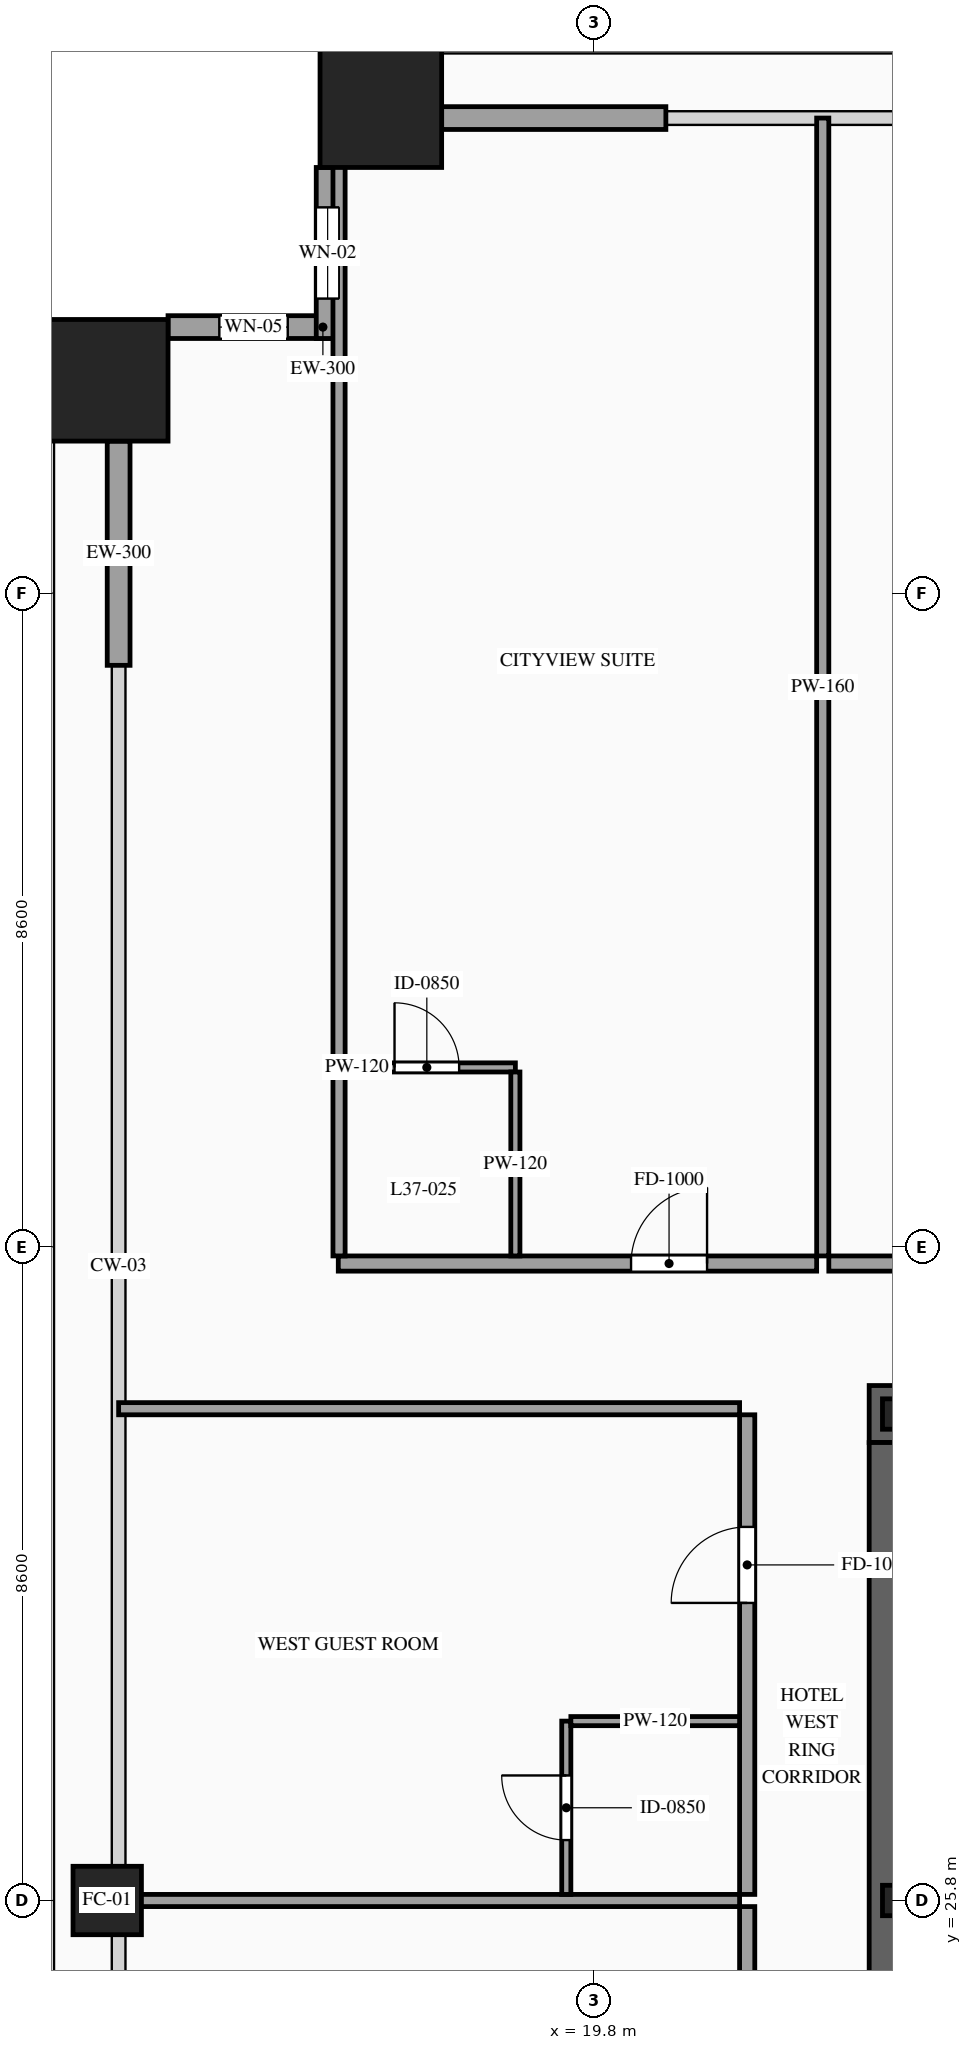
"""IFC4 building model, lengths in metres.
Left out: names, types, materials, properties, quantities, classifications, styles, units other than length and angle.
Written with IfcOpenShell. Run it as: python <this file> out.ifc"""

import sys

from ifc_helpers import new_model, si_unit, direction, frame, frame_2d, origin, origin_2d, place, context, subcontext, project, spatial, rectangle, hollow_rectangle, i_section, extrude, source, transform, mapped, element, fill, save


model = new_model("IFC4")
c1 = context("Model", 3, precision=1e-05, world=origin(), true_north=direction((0.0, 1.0)))
c2 = subcontext(c1, "Body", "Model", "MODEL_VIEW")
j1 = project(units=[si_unit("LENGTHUNIT", "METRE"), si_unit("PLANEANGLEUNIT", "RADIAN")], contexts=[c1])
p1 = place(None, origin())
s1 = spatial("IfcSite", under=j1, at=p1, CompositionType="ELEMENT")
p2 = place(p1, origin())
s2 = spatial("IfcBuilding", under=s1, at=p2, CompositionType="ELEMENT")
p3 = place(p2, frame((0.0, 0.0, 141.6)))
s3 = spatial("IfcBuildingStorey", under=s2, at=p3, CompositionType="ELEMENT", Elevation=141.6)
p4 = place(p3, frame((23.425, 32.2, 0.0), z_axis=(0.0, 0.0, 1.0), x_axis=(1.0, 0.0, 0.0)))
e1 = element("IfcWall", 1, at=p4, inside=s3, PredefinedType="SHEAR", context=c2, shape_type="SweptSolid", body=[
    extrude(rectangle(XDim=27.15, YDim=0.75, at=frame_2d((13.575, 0.0))), origin(), (0.0, 0.0, 1.0), 3.6),
])
p5 = place(p4, frame((4.645, 0.0, 0.0)))
e2 = element("IfcOpeningElement", 2, at=p5, cuts=e1, PredefinedType="OPENING", context=c2, shape_type="SweptSolid", body=[
    extrude(rectangle(XDim=0.9, YDim=2.15, at=frame_2d((0.45, 1.075))), frame((0.0, 0.39, 0.0), z_axis=(0.0, -1.0, 0.0), x_axis=(1.0, 0.0, 0.0)), (0.0, 0.0, 1.0), 0.78),
])
p6 = place(p4, frame((9.925, 0.0, 0.0)))
e3 = element("IfcOpeningElement", 3, at=p6, cuts=e1, PredefinedType="OPENING", context=c2, shape_type="SweptSolid", body=[
    extrude(rectangle(XDim=1.1, YDim=2.2, at=frame_2d((0.55, 1.1))), frame((0.0, 0.39, 0.0), z_axis=(0.0, -1.0, 0.0), x_axis=(1.0, 0.0, 0.0)), (0.0, 0.0, 1.0), 0.78),
])
p7 = place(p4, frame((15.775, 0.0, 0.0)))
e4 = element("IfcOpeningElement", 4, at=p7, cuts=e1, PredefinedType="OPENING", context=c2, shape_type="SweptSolid", body=[
    extrude(rectangle(XDim=1.1, YDim=2.2, at=frame_2d((0.55, 1.1))), frame((0.0, 0.39, 0.0), z_axis=(0.0, -1.0, 0.0), x_axis=(1.0, 0.0, 0.0)), (0.0, 0.0, 1.0), 0.78),
])
p8 = place(p4, frame((18.975, 0.0, 0.0)))
e5 = element("IfcOpeningElement", 5, at=p8, cuts=e1, PredefinedType="OPENING", context=c2, shape_type="SweptSolid", body=[
    extrude(rectangle(XDim=0.9, YDim=2.15, at=frame_2d((0.45, 1.075))), frame((0.0, 0.39, 0.0), z_axis=(0.0, -1.0, 0.0), x_axis=(1.0, 0.0, 0.0)), (0.0, 0.0, 1.0), 0.78),
])
m1 = source(origin(), c2, "Body", "SweptSolid", [
    extrude(rectangle(XDim=12.05, YDim=0.75, at=frame_2d((6.025, 0.0))), origin(), (0.0, 0.0, 1.0), 3.6),
])
p9 = place(p3, frame((23.8, 19.775, 0.0), z_axis=(0.0, 0.0, 1.0), x_axis=(0.0, 1.0, 0.0)))
e6 = element("IfcWall", 6, at=p9, inside=s3, PredefinedType="SHEAR", context=c2, shape_type="MappedRepresentation", body=[
    mapped(m1, transform((0.0, 0.0, 0.0), scale=1.0)),
])
m2 = source(origin(), c2, "Body", "SweptSolid", [
    extrude(i_section(OverallWidth=0.4, OverallDepth=0.4, WebThickness=0.013, FlangeThickness=0.021, at=origin_2d()), origin(), (0.0, 0.0, 1.0), 3.6),
])
for number, where, z_axis, x_axis in (
    (7, (23.8, 25.8, 0.0), (0.0, 0.0, 1.0), (1.0, 0.0, 0.0)),
    (8, (23.8, 32.2, 0.0), (0.0, 0.0, 1.0), (1.0, 0.0, 0.0)),
):
    element("IfcColumn", number, at=place(p3, frame(where, z_axis=z_axis, x_axis=x_axis)), inside=s3, PredefinedType="COLUMN", context=c2, shape_type="MappedRepresentation", body=[
        mapped(m2, transform((0.0, 0.0, 0.0), scale=1.0)),
    ])
m3 = source(origin(), c2, "Body", "SweptSolid", [
    extrude(hollow_rectangle(XDim=1.6, YDim=1.6, WallThickness=0.07, at=origin_2d()), origin(), (0.0, 0.0, 1.0), 3.6),
])
p10 = place(p3, frame((17.0, 49.4, 0.0), z_axis=(0.0, 0.0, 1.0), x_axis=(1.0, 0.0, 0.0)))
e9 = element("IfcColumn", 9, at=p10, inside=s3, PredefinedType="COLUMN", context=c2, shape_type="MappedRepresentation", body=[
    mapped(m3, transform((0.0, 0.0, 0.0), scale=1.0)),
])
m4 = source(origin(), c2, "Body", "SweptSolid", [
    extrude(hollow_rectangle(XDim=0.9, YDim=0.9, WallThickness=0.042, at=origin_2d()), origin(), (0.0, 0.0, 1.0), 3.6),
])
p11 = place(p3, frame((13.4, 25.8, 0.0), z_axis=(0.0, 0.0, 1.0), x_axis=(1.0, 0.0, 0.0)))
e10 = element("IfcColumn", 10, at=p11, inside=s3, PredefinedType="COLUMN", context=c2, shape_type="MappedRepresentation", body=[
    mapped(m4, transform((0.0, 0.0, 0.0), scale=1.0)),
])
p12 = place(p3, frame((13.4, 45.8, 0.0), z_axis=(0.0, 0.0, 1.0), x_axis=(1.0, 0.0, 0.0)))
e11 = element("IfcColumn", 11, at=p12, inside=s3, PredefinedType="COLUMN", context=c2, shape_type="MappedRepresentation", body=[
    mapped(m3, transform((0.0, 0.0, 0.0), scale=1.0)),
])
p13 = place(p3, frame((16.45, 46.5, 0.0), z_axis=(0.0, 0.0, 1.0), x_axis=(-1.0, 0.0, 0.0)))
e12 = element("IfcWall", 12, at=p13, inside=s3, PredefinedType="SOLIDWALL", context=c2, shape_type="SweptSolid", body=[
    extrude(rectangle(XDim=2.25, YDim=0.3, at=frame_2d((1.125, 0.0))), origin(), (0.0, 0.0, 1.0), 3.38),
])
p14 = place(p13, frame((0.675, 0.0, 0.85)))
e13 = element("IfcOpeningElement", 13, at=p14, cuts=e12, PredefinedType="OPENING", context=c2, shape_type="SweptSolid", body=[
    extrude(rectangle(XDim=0.9, YDim=1.5, at=frame_2d((0.45, 0.75))), frame((0.0, 0.165, 0.0), z_axis=(0.0, -1.0, 0.0), x_axis=(1.0, 0.0, 0.0)), (0.0, 0.0, 1.0), 0.33),
])
p15 = place(p3, frame((16.3, 48.6, 0.0), z_axis=(0.0, 0.0, 1.0), x_axis=(0.0, -1.0, 0.0)))
e14 = element("IfcWall", 14, at=p15, inside=s3, PredefinedType="SOLIDWALL", context=c2, shape_type="SweptSolid", body=[
    extrude(rectangle(XDim=2.25, YDim=0.3, at=frame_2d((1.125, 0.0))), origin(), (0.0, 0.0, 1.0), 3.38),
])
p16 = place(p15, frame((0.525, 0.0, 0.85)))
e15 = element("IfcOpeningElement", 15, at=p16, cuts=e14, PredefinedType="OPENING", context=c2, shape_type="SweptSolid", body=[
    extrude(rectangle(XDim=1.2, YDim=2.1, at=frame_2d((0.6, 1.05))), frame((0.0, 0.165, 0.0), z_axis=(0.0, -1.0, 0.0), x_axis=(1.0, 0.0, 0.0)), (0.0, 0.0, 1.0), 0.33),
])
m5 = source(origin(), c2, "Body", "SweptSolid", [
    extrude(rectangle(XDim=2.95, YDim=0.3, at=frame_2d((1.475, 0.0))), origin(), (0.0, 0.0, 1.0), 2.775),
])
for number, where, z_axis, x_axis in (
    (16, (17.8, 49.25, 0.0), (0.0, 0.0, 1.0), (1.0, 0.0, 0.0)),
    (17, (13.55, 42.05, 0.0), (0.0, 0.0, 1.0), (0.0, 1.0, 0.0)),
):
    element("IfcWall", number, at=place(p3, frame(where, z_axis=z_axis, x_axis=x_axis)), inside=s3, PredefinedType="SOLIDWALL", context=c2, shape_type="MappedRepresentation", body=[
        mapped(m5, transform((0.0, 0.0, 0.0), scale=1.0)),
    ])
p17 = place(p3, frame((16.44, 34.18, 0.0), z_axis=(0.0, 0.0, 1.0), x_axis=(1.0, 0.0, 0.0)))
e18 = element("IfcWall", 18, at=p17, inside=s3, PredefinedType="PARTITIONING", context=c2, shape_type="SweptSolid", body=[
    extrude(rectangle(XDim=6.294, YDim=0.2, at=frame_2d((3.147, 0.0))), origin(), (0.0, 0.0, 1.0), 3.38),
])
p18 = place(p17, frame((3.852, 0.0, 0.0)))
e19 = element("IfcOpeningElement", 19, at=p18, cuts=e18, PredefinedType="OPENING", context=c2, shape_type="SweptSolid", body=[
    extrude(rectangle(XDim=1.0, YDim=2.2, at=frame_2d((0.5, 1.1))), frame((0.0, 0.115, 0.0), z_axis=(0.0, -1.0, 0.0), x_axis=(1.0, 0.0, 0.0)), (0.0, 0.0, 1.0), 0.23),
])
m6 = source(origin(), c2, "Body", "SweptSolid", [
    extrude(rectangle(XDim=14.97, YDim=0.16, at=frame_2d((7.485, 0.0))), origin(), (0.0, 0.0, 1.0), 3.38),
])
p19 = place(p3, frame((22.814, 34.28, 0.0), z_axis=(0.0, 0.0, 1.0), x_axis=(0.0, 1.0, 0.0)))
e20 = element("IfcWall", 20, at=p19, inside=s3, PredefinedType="PARTITIONING", context=c2, shape_type="MappedRepresentation", body=[
    mapped(m6, transform((0.0, 0.0, 0.0), scale=1.0)),
])
p20 = place(p3, frame((16.44, 36.76, 0.0), z_axis=(0.0, 0.0, 1.0), x_axis=(1.0, 0.0, 0.0)))
e21 = element("IfcWall", 21, at=p20, inside=s3, PredefinedType="PARTITIONING", context=c2, shape_type="SweptSolid", body=[
    extrude(rectangle(XDim=2.33, YDim=0.12, at=frame_2d((1.165, 0.0))), origin(), (0.0, 0.0, 1.0), 3.38),
])
p21 = place(p20, frame((0.74, 0.0, 0.0)))
e22 = element("IfcOpeningElement", 22, at=p21, cuts=e21, PredefinedType="OPENING", context=c2, shape_type="SweptSolid", body=[
    extrude(rectangle(XDim=0.85, YDim=2.1, at=frame_2d((0.425, 1.05))), frame((0.0, 0.075, 0.0), z_axis=(0.0, -1.0, 0.0), x_axis=(1.0, 0.0, 0.0)), (0.0, 0.0, 1.0), 0.15),
])
m7 = source(origin(), c2, "Body", "SweptSolid", [
    extrude(rectangle(XDim=2.42, YDim=0.12, at=frame_2d((1.21, 0.0))), origin(), (0.0, 0.0, 1.0), 3.38),
])
p22 = place(p3, frame((18.77, 34.28, 0.0), z_axis=(0.0, 0.0, 1.0), x_axis=(0.0, 1.0, 0.0)))
e23 = element("IfcWall", 23, at=p22, inside=s3, PredefinedType="PARTITIONING", context=c2, shape_type="MappedRepresentation", body=[
    mapped(m7, transform((0.0, 0.0, 0.0), scale=1.0)),
])
p23 = place(p3, frame((22.894, 34.18, 0.0), z_axis=(0.0, 0.0, 1.0), x_axis=(1.0, 0.0, 0.0)))
e24 = element("IfcWall", 24, at=p23, inside=s3, PredefinedType="PARTITIONING", context=c2, shape_type="SweptSolid", body=[
    extrude(rectangle(XDim=11.024, YDim=0.2, at=frame_2d((5.512, 0.0))), origin(), (0.0, 0.0, 1.0), 3.38),
])
p24 = place(p23, frame((5.012, 0.0, 0.0)))
e25 = element("IfcOpeningElement", 25, at=p24, cuts=e24, PredefinedType="OPENING", context=c2, shape_type="SweptSolid", body=[
    extrude(rectangle(XDim=1.0, YDim=2.2, at=frame_2d((0.5, 1.1))), frame((0.0, 0.115, 0.0), z_axis=(0.0, -1.0, 0.0), x_axis=(1.0, 0.0, 0.0)), (0.0, 0.0, 1.0), 0.23),
])
m8 = source(origin(), c2, "Body", "SweptSolid", [
    extrude(rectangle(XDim=14.82, YDim=0.16, at=frame_2d((7.41, 0.0))), origin(), (0.0, 0.0, 1.0), 3.38),
])
p25 = place(p3, frame((16.45, 34.28, 0.0), z_axis=(0.0, 0.0, 1.0), x_axis=(0.0, 1.0, 0.0)))
e26 = element("IfcWall", 26, at=p25, inside=s3, PredefinedType="PARTITIONING", context=c2, shape_type="MappedRepresentation", body=[
    mapped(m8, transform((0.0, 0.0, 0.0), scale=1.0)),
])
p26 = place(p3, frame((21.82, 19.41, 0.0), z_axis=(0.0, 0.0, 1.0), x_axis=(0.0, 1.0, 0.0)))
e27 = element("IfcWall", 27, at=p26, inside=s3, PredefinedType="PARTITIONING", context=c2, shape_type="SweptSolid", body=[
    extrude(rectangle(XDim=6.31, YDim=0.2, at=frame_2d((3.155, 0.0))), origin(), (0.0, 0.0, 1.0), 3.38),
])
p27 = place(p26, frame((3.835, 0.0, 0.0)))
e28 = element("IfcOpeningElement", 28, at=p27, cuts=e27, PredefinedType="OPENING", context=c2, shape_type="SweptSolid", body=[
    extrude(rectangle(XDim=1.0, YDim=2.2, at=frame_2d((0.5, 1.1))), frame((0.0, 0.115, 0.0), z_axis=(0.0, -1.0, 0.0), x_axis=(1.0, 0.0, 0.0)), (0.0, 0.0, 1.0), 0.23),
])
m9 = source(origin(), c2, "Body", "SweptSolid", [
    extrude(rectangle(XDim=8.17, YDim=0.16, at=frame_2d((4.085, 0.0))), origin(), (0.0, 0.0, 1.0), 2.675),
])
p28 = place(p3, frame((13.55, 25.8, 0.0), z_axis=(0.0, 0.0, 1.0), x_axis=(1.0, 0.0, 0.0)))
e29 = element("IfcWall", 29, at=p28, inside=s3, PredefinedType="PARTITIONING", context=c2, shape_type="MappedRepresentation", body=[
    mapped(m9, transform((0.0, 0.0, 0.0), scale=1.0)),
])
p29 = place(p3, frame((21.82, 25.88, 0.0), z_axis=(0.0, 0.0, 1.0), x_axis=(0.0, 1.0, 0.0)))
e30 = element("IfcWall", 30, at=p29, inside=s3, PredefinedType="PARTITIONING", context=c2, shape_type="SweptSolid", body=[
    extrude(rectangle(XDim=6.31, YDim=0.2, at=frame_2d((3.155, 0.0))), origin(), (0.0, 0.0, 1.0), 3.38),
])
p30 = place(p29, frame((3.835, 0.0, 0.0)))
e31 = element("IfcOpeningElement", 31, at=p30, cuts=e30, PredefinedType="OPENING", context=c2, shape_type="SweptSolid", body=[
    extrude(rectangle(XDim=1.0, YDim=2.2, at=frame_2d((0.5, 1.1))), frame((0.0, 0.115, 0.0), z_axis=(0.0, -1.0, 0.0), x_axis=(1.0, 0.0, 0.0)), (0.0, 0.0, 1.0), 0.23),
])
m10 = source(origin(), c2, "Body", "SweptSolid", [
    extrude(rectangle(XDim=8.17, YDim=0.16, at=frame_2d((4.085, 0.0))), origin(), (0.0, 0.0, 1.0), 2.875),
])
p31 = place(p3, frame((13.55, 32.27, 0.0), z_axis=(0.0, 0.0, 1.0), x_axis=(1.0, 0.0, 0.0)))
e32 = element("IfcWall", 32, at=p31, inside=s3, PredefinedType="PARTITIONING", context=c2, shape_type="MappedRepresentation", body=[
    mapped(m10, transform((0.0, 0.0, 0.0), scale=1.0)),
])
p32 = place(p3, frame((19.44, 25.88, 0.0), z_axis=(0.0, 0.0, 1.0), x_axis=(0.0, 1.0, 0.0)))
e33 = element("IfcWall", 33, at=p32, inside=s3, PredefinedType="PARTITIONING", context=c2, shape_type="SweptSolid", body=[
    extrude(rectangle(XDim=2.28, YDim=0.12, at=frame_2d((1.14, 0.0))), origin(), (0.0, 0.0, 1.0), 3.38),
])
p33 = place(p32, frame((0.715, 0.0, 0.0)))
e34 = element("IfcOpeningElement", 34, at=p33, cuts=e33, PredefinedType="OPENING", context=c2, shape_type="SweptSolid", body=[
    extrude(rectangle(XDim=0.85, YDim=2.1, at=frame_2d((0.425, 1.05))), frame((0.0, 0.075, 0.0), z_axis=(0.0, -1.0, 0.0), x_axis=(1.0, 0.0, 0.0)), (0.0, 0.0, 1.0), 0.15),
])
m11 = source(origin(), c2, "Body", "SweptSolid", [
    extrude(rectangle(XDim=2.22, YDim=0.12, at=frame_2d((1.11, 0.0))), origin(), (0.0, 0.0, 1.0), 3.38),
])
p34 = place(p3, frame((19.5, 28.16, 0.0), z_axis=(0.0, 0.0, 1.0), x_axis=(1.0, 0.0, 0.0)))
e35 = element("IfcWall", 35, at=p34, inside=s3, PredefinedType="PARTITIONING", context=c2, shape_type="MappedRepresentation", body=[
    mapped(m11, transform((0.0, 0.0, 0.0), scale=1.0)),
])
m12 = source(origin(), c2, "Body", "SweptSolid", [
    extrude(rectangle(XDim=0.9, YDim=1.5, at=frame_2d((0.45, 0.75))), frame((0.0, 0.03, 0.0), z_axis=(0.0, -1.0, 0.0), x_axis=(1.0, 0.0, 0.0)), (0.0, 0.0, 1.0), 0.06),
])
p35 = place(p14, origin())
e36 = element("IfcWindow", 36, at=p35, inside=s3, PartitioningType="SINGLE_PANEL", PredefinedType="WINDOW", context=c2, shape_type="MappedRepresentation", body=[
    mapped(m12, transform((0.0, 0.0, 0.0), scale=1.0)),
])
fill(e13, e36)
m13 = source(origin(), c2, "Body", "SweptSolid", [
    extrude(rectangle(XDim=1.2, YDim=2.1, at=frame_2d((0.6, 1.05))), frame((0.0, 0.03, 0.0), z_axis=(0.0, -1.0, 0.0), x_axis=(1.0, 0.0, 0.0)), (0.0, 0.0, 1.0), 0.06),
])
p36 = place(p16, origin())
e37 = element("IfcWindow", 37, at=p36, inside=s3, PartitioningType="SINGLE_PANEL", PredefinedType="WINDOW", context=c2, shape_type="MappedRepresentation", body=[
    mapped(m13, transform((0.0, 0.0, 0.0), scale=1.0)),
])
fill(e15, e37)
m14 = source(origin(), c2, "Body", "SweptSolid", [
    extrude(rectangle(XDim=1.0, YDim=2.2, at=frame_2d((0.5, 1.1))), frame((0.0, 0.025, 0.0), z_axis=(0.0, -1.0, 0.0), x_axis=(1.0, 0.0, 0.0)), (0.0, 0.0, 1.0), 0.05),
])
p37 = place(p18, origin())
e38 = element("IfcDoor", 38, at=p37, inside=s3, OperationType="SINGLE_SWING_RIGHT", PredefinedType="DOOR", context=c2, shape_type="MappedRepresentation", body=[
    mapped(m14, transform((0.0, 0.0, 0.0), scale=1.0)),
])
fill(e19, e38)
m15 = source(origin(), c2, "Body", "SweptSolid", [
    extrude(rectangle(XDim=0.85, YDim=2.1, at=frame_2d((0.425, 1.05))), frame((0.0, 0.025, 0.0), z_axis=(0.0, -1.0, 0.0), x_axis=(1.0, 0.0, 0.0)), (0.0, 0.0, 1.0), 0.05),
])
p38 = place(p21, origin())
e39 = element("IfcDoor", 39, at=p38, inside=s3, OperationType="SINGLE_SWING_LEFT", PredefinedType="DOOR", context=c2, shape_type="MappedRepresentation", body=[
    mapped(m15, transform((0.0, 0.0, 0.0), scale=1.0)),
])
fill(e22, e39)
p39 = place(p30, origin())
e40 = element("IfcDoor", 40, at=p39, inside=s3, OperationType="SINGLE_SWING_LEFT", PredefinedType="DOOR", context=c2, shape_type="MappedRepresentation", body=[
    mapped(m14, transform((0.0, 0.0, 0.0), scale=1.0)),
])
fill(e31, e40)
p40 = place(p33, origin())
e41 = element("IfcDoor", 41, at=p40, inside=s3, OperationType="SINGLE_SWING_RIGHT", PredefinedType="DOOR", context=c2, shape_type="MappedRepresentation", body=[
    mapped(m15, transform((0.0, 0.0, 0.0), scale=1.0)),
])
fill(e34, e41)
save(model, sys.argv[1])
